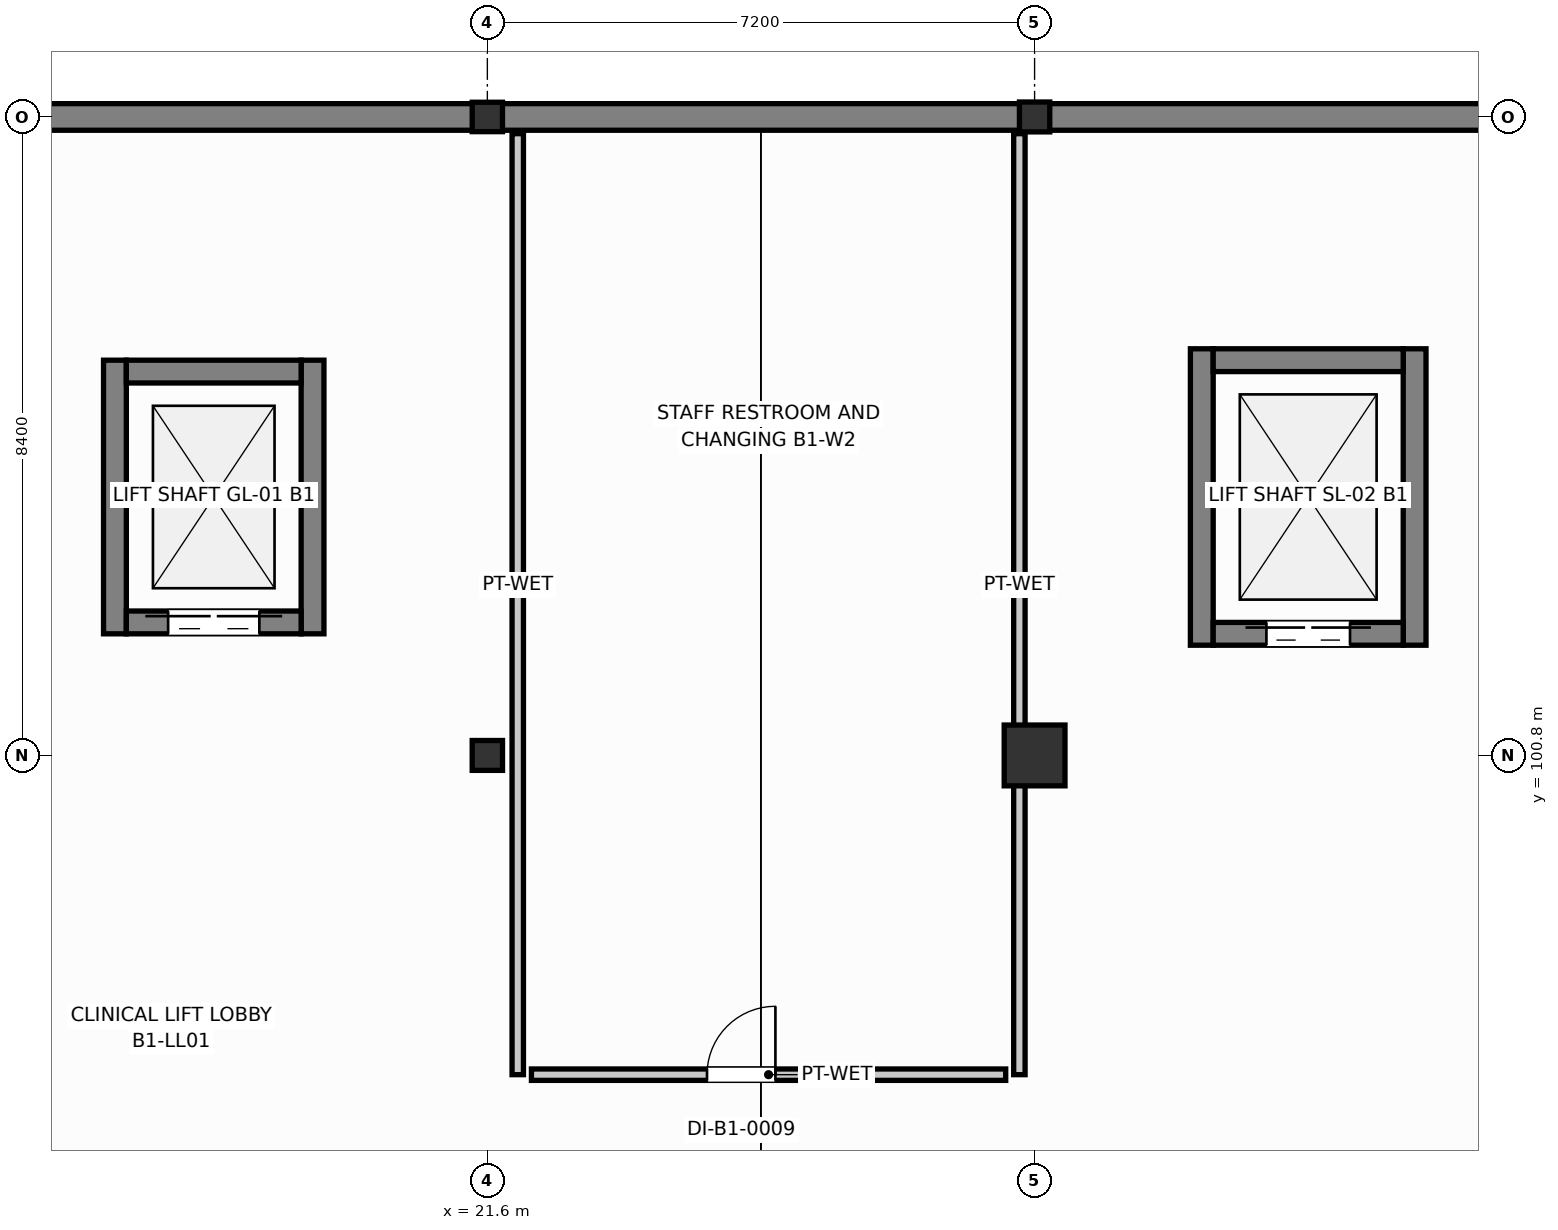
"""IFC4 building model, lengths in metres.
Left out: names, types, materials, properties, quantities, classifications, styles, units other than length and angle.
Written with IfcOpenShell. Run it as: python <this file> out.ifc"""

import sys

from ifc_helpers import new_model, si_unit, direction, frame, frame_2d, origin, origin_2d, place, context, subcontext, project, spatial, rectangle, i_section, extrude, element, fill, save


model = new_model("IFC4")
c1 = context("Model", 3, precision=1e-05, world=origin(), true_north=direction((0.0, 1.0)))
c2 = subcontext(c1, "Body", "Model", "MODEL_VIEW")
j1 = project(units=[si_unit("LENGTHUNIT", "METRE"), si_unit("PLANEANGLEUNIT", "RADIAN")], contexts=[c1])
p1 = place(None, origin())
s1 = spatial("IfcSite", under=j1, at=p1, CompositionType="ELEMENT")
p2 = place(p1, origin())
s2 = spatial("IfcBuilding", under=s1, at=p2, CompositionType="ELEMENT")
p3 = place(p2, frame((0.0, 0.0, -4.2)))
s3 = spatial("IfcBuildingStorey", under=s2, at=p3, CompositionType="ELEMENT", Elevation=-4.2)
p4 = place(p3, frame((14.4, 109.2, 0.0), z_axis=(0.0, 0.0, 1.0), x_axis=(1.0, 0.0, 0.0)))
e1 = element("IfcWall", 1, at=p4, inside=s3, PredefinedType="USERDEFINED", context=c2, shape_type="SweptSolid", body=[
    extrude(rectangle(XDim=7.2, YDim=0.35, at=frame_2d((3.6, 0.0))), origin(), (0.0, 0.0, 1.0), 3.96),
])
for number, where, z_axis, x_axis in (
    (2, (21.6, 109.2, 0.0), (0.0, 0.0, 1.0), (1.0, 0.0, 0.0)),
    (3, (28.8, 109.2, 0.0), (0.0, 0.0, 1.0), (1.0, 0.0, 0.0)),
):
    element("IfcWall", number, at=place(p3, frame(where, z_axis=z_axis, x_axis=x_axis)), inside=s3, PredefinedType="USERDEFINED", context=c2, shape_type="SweptSolid", body=[
        extrude(rectangle(XDim=7.2, YDim=0.35, at=frame_2d((3.6, 0.0))), origin(), (0.0, 0.0, 1.0), 3.96),
    ])
p5 = place(p3, frame((21.6, 100.8, 0.0), z_axis=(0.0, 0.0, 1.0), x_axis=(1.0, 0.0, 0.0)))
e4 = element("IfcColumn", 4, at=p5, inside=s3, PredefinedType="COLUMN", context=c2, shape_type="SweptSolid", body=[
    extrude(i_section(OverallWidth=0.399, OverallDepth=0.393, WebThickness=0.023, FlangeThickness=0.036, FilletRadius=0.02, at=origin_2d()), origin(), (0.0, 0.0, 1.0), 4.2),
])
p6 = place(p3, frame((21.6, 109.2, 0.0), z_axis=(0.0, 0.0, 1.0), x_axis=(1.0, 0.0, 0.0)))
e5 = element("IfcColumn", 5, at=p6, inside=s3, PredefinedType="COLUMN", context=c2, shape_type="SweptSolid", body=[
    extrude(i_section(OverallWidth=0.398, OverallDepth=0.387, WebThickness=0.021, FlangeThickness=0.033, FilletRadius=0.02, at=origin_2d()), origin(), (0.0, 0.0, 1.0), 4.2),
])
p7 = place(p3, frame((28.8, 100.8, 0.0), z_axis=(0.0, 0.0, 1.0), x_axis=(1.0, 0.0, 0.0)))
e6 = element("IfcColumn", 6, at=p7, inside=s3, PredefinedType="COLUMN", context=c2, shape_type="SweptSolid", body=[
    extrude(rectangle(XDim=0.8, YDim=0.8, at=origin_2d()), origin(), (0.0, 0.0, 1.0), 4.2),
])
p8 = place(p3, frame((28.8, 109.2, 0.0), z_axis=(0.0, 0.0, 1.0), x_axis=(1.0, 0.0, 0.0)))
e7 = element("IfcColumn", 7, at=p8, inside=s3, PredefinedType="COLUMN", context=c2, shape_type="SweptSolid", body=[
    extrude(i_section(OverallWidth=0.399, OverallDepth=0.393, WebThickness=0.023, FlangeThickness=0.036, FilletRadius=0.02, at=origin_2d()), origin(), (0.0, 0.0, 1.0), 4.2),
])
for number, where, z_axis, x_axis in (
    (8, (31.0, 102.25, 0.0), (0.0, 0.0, 1.0), (0.0, 1.0, 0.0)),
    (9, (33.8, 102.25, 0.0), (0.0, 0.0, 1.0), (0.0, 1.0, 0.0)),
):
    element("IfcWall", number, at=place(p3, frame(where, z_axis=z_axis, x_axis=x_axis)), inside=s3, PredefinedType="SHEAR", context=c2, shape_type="SweptSolid", body=[
        extrude(rectangle(XDim=3.9, YDim=0.3, at=frame_2d((1.95, 0.0))), origin(), (0.0, 0.0, 1.0), 3.96),
    ])
p9 = place(p3, frame((31.15, 106.0, 0.0), z_axis=(0.0, 0.0, 1.0), x_axis=(1.0, 0.0, 0.0)))
e10 = element("IfcWall", 10, at=p9, inside=s3, PredefinedType="SHEAR", context=c2, shape_type="SweptSolid", body=[
    extrude(rectangle(XDim=2.5, YDim=0.3, at=frame_2d((1.25, 0.0))), origin(), (0.0, 0.0, 1.0), 3.96),
])
p10 = place(p3, frame((31.15, 102.4, 0.0), z_axis=(0.0, 0.0, 1.0), x_axis=(1.0, 0.0, 0.0)))
e11 = element("IfcWall", 11, at=p10, inside=s3, PredefinedType="SHEAR", context=c2, shape_type="SweptSolid", body=[
    extrude(rectangle(XDim=2.5, YDim=0.3, at=frame_2d((1.25, 0.0))), origin(), (0.0, 0.0, 1.0), 3.96),
])
p11 = place(p10, frame((0.7, 0.0, 0.0)))
e12 = element("IfcOpeningElement", 12, at=p11, cuts=e11, PredefinedType="OPENING", context=c2, shape_type="SweptSolid", body=[
    extrude(rectangle(XDim=1.1, YDim=2.15, at=frame_2d((0.55, 1.075))), frame((0.0, 0.16, 0.0), z_axis=(0.0, -1.0, 0.0), x_axis=(1.0, 0.0, 0.0)), (0.0, 0.0, 1.0), 0.32),
])
for number, where, z_axis, x_axis in (
    (13, (16.7, 102.4, 0.0), (0.0, 0.0, 1.0), (0.0, 1.0, 0.0)),
    (14, (19.3, 102.4, 0.0), (0.0, 0.0, 1.0), (0.0, 1.0, 0.0)),
):
    element("IfcWall", number, at=place(p3, frame(where, z_axis=z_axis, x_axis=x_axis)), inside=s3, PredefinedType="SHEAR", context=c2, shape_type="SweptSolid", body=[
        extrude(rectangle(XDim=3.6, YDim=0.3, at=frame_2d((1.8, 0.0))), origin(), (0.0, 0.0, 1.0), 3.96),
    ])
p12 = place(p3, frame((16.85, 105.85, 0.0), z_axis=(0.0, 0.0, 1.0), x_axis=(1.0, 0.0, 0.0)))
e15 = element("IfcWall", 15, at=p12, inside=s3, PredefinedType="SHEAR", context=c2, shape_type="SweptSolid", body=[
    extrude(rectangle(XDim=2.3, YDim=0.3, at=frame_2d((1.15, 0.0))), origin(), (0.0, 0.0, 1.0), 3.96),
])
p13 = place(p3, frame((16.85, 102.55, 0.0), z_axis=(0.0, 0.0, 1.0), x_axis=(1.0, 0.0, 0.0)))
e16 = element("IfcWall", 16, at=p13, inside=s3, PredefinedType="SHEAR", context=c2, shape_type="SweptSolid", body=[
    extrude(rectangle(XDim=2.3, YDim=0.3, at=frame_2d((1.15, 0.0))), origin(), (0.0, 0.0, 1.0), 3.96),
])
p14 = place(p13, frame((0.55, 0.0, 0.0)))
e17 = element("IfcOpeningElement", 17, at=p14, cuts=e16, PredefinedType="OPENING", context=c2, shape_type="SweptSolid", body=[
    extrude(rectangle(XDim=1.2, YDim=2.15, at=frame_2d((0.6, 1.075))), frame((0.0, 0.16, 0.0), z_axis=(0.0, -1.0, 0.0), x_axis=(1.0, 0.0, 0.0)), (0.0, 0.0, 1.0), 0.32),
])
p15 = place(p3, frame((22.0, 96.6, 0.0), z_axis=(0.0, 0.0, 1.0), x_axis=(0.0, 1.0, 0.0)))
e18 = element("IfcWall", 18, at=p15, inside=s3, PredefinedType="PLUMBINGWALL", context=c2, shape_type="SweptSolid", body=[
    extrude(rectangle(XDim=12.38, YDim=0.15, at=frame_2d((6.19, 0.0))), origin(), (0.0, 0.0, 1.0), 3.532),
])
p16 = place(p3, frame((28.6, 108.98, 0.0), z_axis=(0.0, 0.0, 1.0), x_axis=(0.0, -1.0, 0.0)))
e19 = element("IfcWall", 19, at=p16, inside=s3, PredefinedType="PLUMBINGWALL", context=c2, shape_type="SweptSolid", body=[
    extrude(rectangle(XDim=12.38, YDim=0.15, at=frame_2d((6.19, 0.0))), origin(), (0.0, 0.0, 1.0), 3.485),
])
p17 = place(p3, frame((28.42, 96.6, 0.0), z_axis=(0.0, 0.0, 1.0), x_axis=(-1.0, 0.0, 0.0)))
e20 = element("IfcWall", 20, at=p17, inside=s3, PredefinedType="PLUMBINGWALL", context=c2, shape_type="SweptSolid", body=[
    extrude(rectangle(XDim=6.24, YDim=0.15, at=frame_2d((3.12, 0.0))), origin(), (0.0, 0.0, 1.0), 3.945),
])
p18 = place(p17, frame((3.03, 0.0, 0.0)))
e21 = element("IfcOpeningElement", 21, at=p18, cuts=e20, PredefinedType="OPENING", context=c2, shape_type="SweptSolid", body=[
    extrude(rectangle(XDim=0.9, YDim=2.1, at=frame_2d((0.45, 1.05))), frame((0.0, 0.085, 0.0), z_axis=(0.0, -1.0, 0.0), x_axis=(1.0, 0.0, 0.0)), (0.0, 0.0, 1.0), 0.17),
])
p19 = place(p11, origin())
e22 = element("IfcDoor", 22, at=p19, inside=s3, OperationType="DOUBLE_DOOR_SLIDING", PredefinedType="DOOR", context=c2, shape_type="SweptSolid", body=[
    extrude(rectangle(XDim=1.1, YDim=2.15, at=frame_2d((0.55, 1.075))), frame((0.0, 0.025, 0.0), z_axis=(0.0, -1.0, 0.0), x_axis=(1.0, 0.0, 0.0)), (0.0, 0.0, 1.0), 0.05),
])
fill(e12, e22)
p20 = place(p14, origin())
e23 = element("IfcDoor", 23, at=p20, inside=s3, OperationType="DOUBLE_DOOR_SLIDING", PredefinedType="DOOR", context=c2, shape_type="SweptSolid", body=[
    extrude(rectangle(XDim=1.2, YDim=2.15, at=frame_2d((0.6, 1.075))), frame((0.0, 0.025, 0.0), z_axis=(0.0, -1.0, 0.0), x_axis=(1.0, 0.0, 0.0)), (0.0, 0.0, 1.0), 0.05),
])
fill(e17, e23)
p21 = place(p18, frame((0.9, 0.0, 0.0), z_axis=(0.0, 0.0, 1.0), x_axis=(-1.0, 0.0, 0.0)))
e24 = element("IfcDoor", 24, at=p21, inside=s3, OperationType="SINGLE_SWING_RIGHT", PredefinedType="DOOR", context=c2, shape_type="SweptSolid", body=[
    extrude(rectangle(XDim=0.9, YDim=2.1, at=frame_2d((0.45, 1.05))), frame((0.0, 0.025, 0.0), z_axis=(0.0, -1.0, 0.0), x_axis=(1.0, 0.0, 0.0)), (0.0, 0.0, 1.0), 0.05),
])
fill(e21, e24)
save(model, sys.argv[1])
